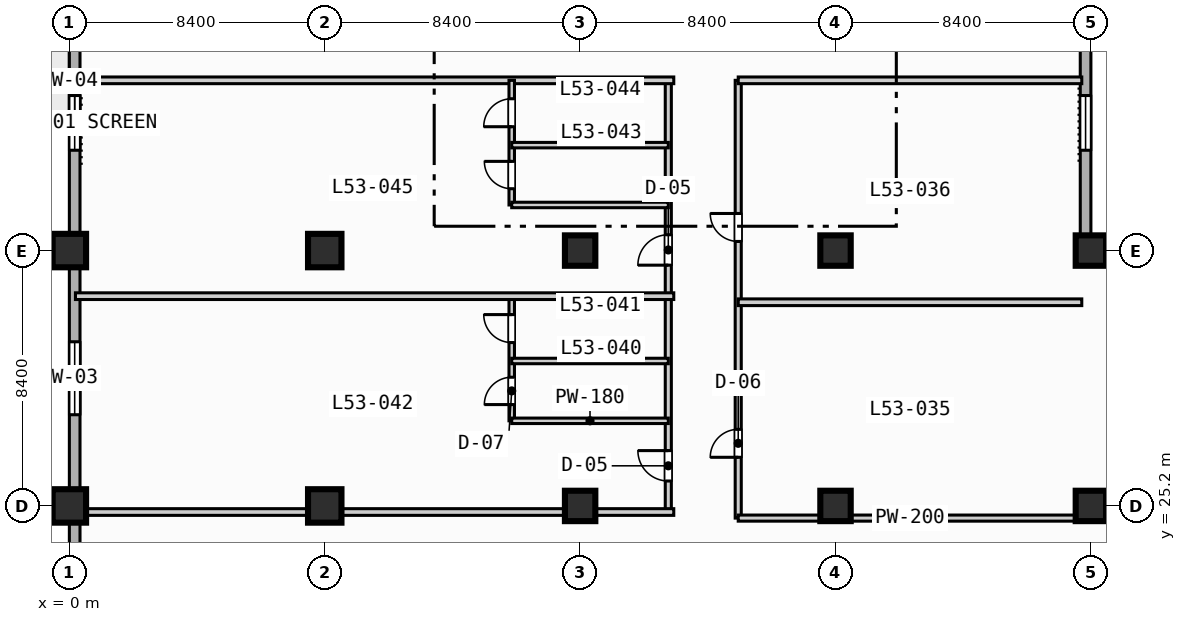
"""IFC4 building model, lengths in metres.
Left out: names, types, materials, properties, quantities, classifications, styles, units other than length and angle.
Written with IfcOpenShell. Run it as: python <this file> out.ifc"""

import sys

from ifc_helpers import new_model, si_unit, direction, frame, frame_2d, origin, origin_2d, place, context, subcontext, project, spatial, rectangle, extrude, element, fill, save


model = new_model("IFC4")
c1 = context("Model", 3, precision=1e-05, world=origin(), true_north=direction((0.0, 1.0)))
c2 = subcontext(c1, "Body", "Model", "MODEL_VIEW")
j1 = project(units=[si_unit("LENGTHUNIT", "METRE"), si_unit("PLANEANGLEUNIT", "RADIAN")], contexts=[c1])
p1 = place(None, origin())
s1 = spatial("IfcSite", under=j1, at=p1, CompositionType="ELEMENT")
p2 = place(p1, origin())
s2 = spatial("IfcBuilding", under=s1, at=p2, CompositionType="ELEMENT")
p3 = place(p2, frame((0.0, 0.0, 216.1)))
s3 = spatial("IfcBuildingStorey", under=s2, at=p3, CompositionType="ELEMENT", Elevation=216.1)
for number, where, z_axis, x_axis in (
    (1, (0.0, 25.2, 0.0), (0.0, 0.0, 1.0), (1.0, 0.0, 0.0)),
    (2, (0.0, 33.6, 0.0), (0.0, 0.0, 1.0), (1.0, 0.0, 0.0)),
    (3, (8.4, 25.2, 0.0), (0.0, 0.0, 1.0), (1.0, 0.0, 0.0)),
    (4, (8.4, 33.6, 0.0), (0.0, 0.0, 1.0), (1.0, 0.0, 0.0)),
):
    element("IfcColumn", number, at=place(p3, frame(where, z_axis=z_axis, x_axis=x_axis)), inside=s3, PredefinedType="COLUMN", context=c2, shape_type="SweptSolid", body=[
        extrude(rectangle(XDim=1.1, YDim=1.1, at=origin_2d()), origin(), (0.0, 0.0, 1.0), 3.7),
    ])
for number, where, z_axis, x_axis in (
    (5, (16.8, 25.2, 0.0), (0.0, 0.0, 1.0), (1.0, 0.0, 0.0)),
    (6, (16.8, 33.6, 0.0), (0.0, 0.0, 1.0), (1.0, 0.0, 0.0)),
    (7, (25.2, 25.2, 0.0), (0.0, 0.0, 1.0), (1.0, 0.0, 0.0)),
    (8, (25.2, 33.6, 0.0), (0.0, 0.0, 1.0), (1.0, 0.0, 0.0)),
    (9, (33.6, 25.2, 0.0), (0.0, 0.0, 1.0), (1.0, 0.0, 0.0)),
    (10, (33.6, 33.6, 0.0), (0.0, 0.0, 1.0), (1.0, 0.0, 0.0)),
):
    element("IfcColumn", number, at=place(p3, frame(where, z_axis=z_axis, x_axis=x_axis)), inside=s3, PredefinedType="COLUMN", context=c2, shape_type="SweptSolid", body=[
        extrude(rectangle(XDim=1.0, YDim=1.0, at=origin_2d()), origin(), (0.0, 0.0, 1.0), 3.7),
    ])
p4 = place(p3, frame((0.175, 3.175, 0.0), z_axis=(0.0, 0.0, 1.0), x_axis=(0.0, 1.0, 0.0)))
e11 = element("IfcWall", 11, at=p4, inside=s3, PredefinedType="STANDARD", context=c2, shape_type="SweptSolid", body=[
    extrude(rectangle(XDim=69.25, YDim=0.35, at=frame_2d((34.625, 0.0))), origin(), (0.0, 0.0, 1.0), 3.47),
])
p5 = place(p4, frame((42.325, 0.0, 0.0)))
e12 = element("IfcOpeningElement", 12, at=p5, cuts=e11, PredefinedType="OPENING", context=c2, shape_type="SweptSolid", body=[
    extrude(rectangle(XDim=1.4, YDim=2.2, at=frame_2d((0.7, 1.1))), frame((0.0, 0.185, 0.0), z_axis=(0.0, -1.0, 0.0), x_axis=(1.0, 0.0, 0.0)), (0.0, 0.0, 1.0), 0.37),
])
p6 = place(p4, frame((25.025, 0.0, 0.85)))
e13 = element("IfcOpeningElement", 13, at=p6, cuts=e11, PredefinedType="OPENING", context=c2, shape_type="SweptSolid", body=[
    extrude(rectangle(XDim=2.4, YDim=1.95, at=frame_2d((1.2, 0.975))), frame((0.0, 0.185, 0.0), z_axis=(0.0, -1.0, 0.0), x_axis=(1.0, 0.0, 0.0)), (0.0, 0.0, 1.0), 0.37),
])
p7 = place(p4, frame((33.725, 0.0, 0.85)))
e14 = element("IfcOpeningElement", 14, at=p7, cuts=e11, PredefinedType="OPENING", context=c2, shape_type="SweptSolid", body=[
    extrude(rectangle(XDim=1.8, YDim=1.8, at=frame_2d((0.9, 0.9))), frame((0.0, 0.185, 0.0), z_axis=(0.0, -1.0, 0.0), x_axis=(1.0, 0.0, 0.0)), (0.0, 0.0, 1.0), 0.37),
])
p8 = place(p4, frame((58.375, 0.0, 0.85)))
e15 = element("IfcOpeningElement", 15, at=p8, cuts=e11, PredefinedType="OPENING", context=c2, shape_type="SweptSolid", body=[
    extrude(rectangle(XDim=1.8, YDim=1.8, at=frame_2d((0.9, 0.9))), frame((0.0, 0.185, 0.0), z_axis=(0.0, -1.0, 0.0), x_axis=(1.0, 0.0, 0.0)), (0.0, 0.0, 1.0), 0.37),
])
p9 = place(p4, frame((64.775, 0.0, 0.85)))
e16 = element("IfcOpeningElement", 16, at=p9, cuts=e11, PredefinedType="OPENING", context=c2, shape_type="SweptSolid", body=[
    extrude(rectangle(XDim=1.8, YDim=1.8, at=frame_2d((0.9, 0.9))), frame((0.0, 0.185, 0.0), z_axis=(0.0, -1.0, 0.0), x_axis=(1.0, 0.0, 0.0)), (0.0, 0.0, 1.0), 0.37),
])
p10 = place(p3, frame((33.425, 72.425, 0.0), z_axis=(0.0, 0.0, 1.0), x_axis=(0.0, -1.0, 0.0)))
e17 = element("IfcWall", 17, at=p10, inside=s3, PredefinedType="STANDARD", context=c2, shape_type="SweptSolid", body=[
    extrude(rectangle(XDim=39.0, YDim=0.35, at=frame_2d((19.5, 0.0))), origin(), (0.0, 0.0, 1.0), 3.47),
])
p11 = place(p10, frame((33.725, 0.0, 0.85)))
e18 = element("IfcOpeningElement", 18, at=p11, cuts=e17, PredefinedType="OPENING", context=c2, shape_type="SweptSolid", body=[
    extrude(rectangle(XDim=1.8, YDim=1.8, at=frame_2d((0.9, 0.9))), frame((0.0, 0.185, 0.0), z_axis=(0.0, -1.0, 0.0), x_axis=(1.0, 0.0, 0.0)), (0.0, 0.0, 1.0), 0.37),
])
p12 = place(p10, frame((16.925, 0.0, 0.85)))
e19 = element("IfcOpeningElement", 19, at=p12, cuts=e17, PredefinedType="OPENING", context=c2, shape_type="SweptSolid", body=[
    extrude(rectangle(XDim=1.8, YDim=1.8, at=frame_2d((0.9, 0.9))), frame((0.0, 0.185, 0.0), z_axis=(0.0, -1.0, 0.0), x_axis=(1.0, 0.0, 0.0)), (0.0, 0.0, 1.0), 0.37),
])
p13 = place(p10, frame((8.225, 0.0, 0.85)))
e20 = element("IfcOpeningElement", 20, at=p13, cuts=e17, PredefinedType="OPENING", context=c2, shape_type="SweptSolid", body=[
    extrude(rectangle(XDim=2.4, YDim=1.95, at=frame_2d((1.2, 0.975))), frame((0.0, 0.185, 0.0), z_axis=(0.0, -1.0, 0.0), x_axis=(1.0, 0.0, 0.0)), (0.0, 0.0, 1.0), 0.37),
])
p14 = place(p3, frame((33.425, 33.425, 0.0), z_axis=(0.0, 0.0, 1.0), x_axis=(1.0, 0.0, 0.0)))
e21 = element("IfcWall", 21, at=p14, inside=s3, PredefinedType="STANDARD", context=c2, shape_type="SweptSolid", body=[
    extrude(rectangle(XDim=39.0, YDim=0.35, at=frame_2d((19.5, 0.0))), origin(), (0.0, 0.0, 1.0), 3.47),
])
p15 = place(p14, frame((12.075, 0.0, 0.0)))
e22 = element("IfcOpeningElement", 22, at=p15, cuts=e21, PredefinedType="OPENING", context=c2, shape_type="SweptSolid", body=[
    extrude(rectangle(XDim=1.4, YDim=2.2, at=frame_2d((0.7, 1.1))), frame((0.0, 0.185, 0.0), z_axis=(0.0, -1.0, 0.0), x_axis=(1.0, 0.0, 0.0)), (0.0, 0.0, 1.0), 0.37),
])
p16 = place(p14, frame((20.275, 0.0, 0.85)))
e23 = element("IfcOpeningElement", 23, at=p16, cuts=e21, PredefinedType="OPENING", context=c2, shape_type="SweptSolid", body=[
    extrude(rectangle(XDim=1.8, YDim=1.8, at=frame_2d((0.9, 0.9))), frame((0.0, 0.185, 0.0), z_axis=(0.0, -1.0, 0.0), x_axis=(1.0, 0.0, 0.0)), (0.0, 0.0, 1.0), 0.37),
])
p17 = place(p14, frame((28.375, 0.0, 0.85)))
e24 = element("IfcOpeningElement", 24, at=p17, cuts=e21, PredefinedType="OPENING", context=c2, shape_type="SweptSolid", body=[
    extrude(rectangle(XDim=2.4, YDim=1.95, at=frame_2d((1.2, 0.975))), frame((0.0, 0.185, 0.0), z_axis=(0.0, -1.0, 0.0), x_axis=(1.0, 0.0, 0.0)), (0.0, 0.0, 1.0), 0.37),
])
p18 = place(p3, frame((22.0, 24.8, 0.0), z_axis=(0.0, 0.0, 1.0), x_axis=(0.0, 1.0, 0.0)))
e25 = element("IfcWall", 25, at=p18, inside=s3, PredefinedType="PARTITIONING", context=c2, shape_type="SweptSolid", body=[
    extrude(rectangle(XDim=14.4, YDim=0.2, at=frame_2d((7.2, 0.0))), origin(), (0.0, 0.0, 1.0), 3.47),
])
p19 = place(p18, frame((2.0, 0.0, 0.0)))
e26 = element("IfcOpeningElement", 26, at=p19, cuts=e25, PredefinedType="OPENING", context=c2, shape_type="SweptSolid", body=[
    extrude(rectangle(XDim=0.92, YDim=2.1, at=frame_2d((0.46, 1.05))), frame((0.0, 0.11, 0.0), z_axis=(0.0, -1.0, 0.0), x_axis=(1.0, 0.0, 0.0)), (0.0, 0.0, 1.0), 0.22),
])
p20 = place(p18, frame((9.1, 0.0, 0.0)))
e27 = element("IfcOpeningElement", 27, at=p20, cuts=e25, PredefinedType="OPENING", context=c2, shape_type="SweptSolid", body=[
    extrude(rectangle(XDim=0.92, YDim=2.1, at=frame_2d((0.46, 1.05))), frame((0.0, 0.11, 0.0), z_axis=(0.0, -1.0, 0.0), x_axis=(1.0, 0.0, 0.0)), (0.0, 0.0, 1.0), 0.22),
])
p21 = place(p3, frame((22.0, 24.8, 0.0), z_axis=(0.0, 0.0, 1.0), x_axis=(1.0, 0.0, 0.0)))
e28 = element("IfcWall", 28, at=p21, inside=s3, PredefinedType="PARTITIONING", context=c2, shape_type="SweptSolid", body=[
    extrude(rectangle(XDim=11.3, YDim=0.2, at=frame_2d((5.65, 0.0))), origin(), (0.0, 0.0, 1.0), 3.47),
])
for number, where, z_axis, x_axis in (
    (29, (22.0, 31.9, 0.0), (0.0, 0.0, 1.0), (1.0, 0.0, 0.0)),
    (30, (22.0, 39.2, 0.0), (0.0, 0.0, 1.0), (1.0, 0.0, 0.0)),
):
    element("IfcWall", number, at=place(p3, frame(where, z_axis=z_axis, x_axis=x_axis)), inside=s3, PredefinedType="PARTITIONING", context=c2, shape_type="SweptSolid", body=[
        extrude(rectangle(XDim=11.3, YDim=0.22, at=frame_2d((5.65, 0.0))), origin(), (0.0, 0.0, 1.0), 3.47),
    ])
p22 = place(p3, frame((19.7, 25.0, 0.0), z_axis=(0.0, 0.0, 1.0), x_axis=(0.0, 1.0, 0.0)))
e31 = element("IfcWall", 31, at=p22, inside=s3, PredefinedType="PARTITIONING", context=c2, shape_type="SweptSolid", body=[
    extrude(rectangle(XDim=14.2, YDim=0.2, at=frame_2d((7.1, 0.0))), origin(), (0.0, 0.0, 1.0), 3.47),
])
p23 = place(p22, frame((1.02, 0.0, 0.0)))
e32 = element("IfcOpeningElement", 32, at=p23, cuts=e31, PredefinedType="OPENING", context=c2, shape_type="SweptSolid", body=[
    extrude(rectangle(XDim=1.0, YDim=2.15, at=frame_2d((0.5, 1.075))), frame((0.0, 0.11, 0.0), z_axis=(0.0, -1.0, 0.0), x_axis=(1.0, 0.0, 0.0)), (0.0, 0.0, 1.0), 0.22),
])
p24 = place(p22, frame((8.12, 0.0, 0.0)))
e33 = element("IfcOpeningElement", 33, at=p24, cuts=e31, PredefinedType="OPENING", context=c2, shape_type="SweptSolid", body=[
    extrude(rectangle(XDim=1.0, YDim=2.15, at=frame_2d((0.5, 1.075))), frame((0.0, 0.11, 0.0), z_axis=(0.0, -1.0, 0.0), x_axis=(1.0, 0.0, 0.0)), (0.0, 0.0, 1.0), 0.22),
])
p25 = place(p3, frame((0.2, 25.0, 0.0), z_axis=(0.0, 0.0, 1.0), x_axis=(1.0, 0.0, 0.0)))
e34 = element("IfcWall", 34, at=p25, inside=s3, PredefinedType="PARTITIONING", context=c2, shape_type="SweptSolid", body=[
    extrude(rectangle(XDim=19.68, YDim=0.22, at=frame_2d((9.84, 0.0))), origin(), (0.0, 0.0, 1.0), 2.82),
])
p26 = place(p3, frame((14.55, 28.0, 0.0), z_axis=(0.0, 0.0, 1.0), x_axis=(0.0, 1.0, 0.0)))
e35 = element("IfcWall", 35, at=p26, inside=s3, PredefinedType="PLUMBINGWALL", context=c2, shape_type="SweptSolid", body=[
    extrude(rectangle(XDim=4.1, YDim=0.18, at=frame_2d((2.05, 0.0))), origin(), (0.0, 0.0, 1.0), 3.47),
])
p27 = place(p26, frame((0.534, 0.0, 0.0)))
e36 = element("IfcOpeningElement", 36, at=p27, cuts=e35, PredefinedType="OPENING", context=c2, shape_type="SweptSolid", body=[
    extrude(rectangle(XDim=0.9, YDim=2.1, at=frame_2d((0.45, 1.05))), frame((0.0, 0.1, 0.0), z_axis=(0.0, -1.0, 0.0), x_axis=(1.0, 0.0, 0.0)), (0.0, 0.0, 1.0), 0.2),
])
p28 = place(p26, frame((2.574, 0.0, 0.0)))
e37 = element("IfcOpeningElement", 37, at=p28, cuts=e35, PredefinedType="OPENING", context=c2, shape_type="SweptSolid", body=[
    extrude(rectangle(XDim=0.92, YDim=2.1, at=frame_2d((0.46, 1.05))), frame((0.0, 0.1, 0.0), z_axis=(0.0, -1.0, 0.0), x_axis=(1.0, 0.0, 0.0)), (0.0, 0.0, 1.0), 0.2),
])
for number, where, z_axis, x_axis in (
    (38, (14.55, 28.0, 0.0), (0.0, 0.0, 1.0), (1.0, 0.0, 0.0)),
    (39, (14.55, 29.968, 0.0), (0.0, 0.0, 1.0), (1.0, 0.0, 0.0)),
):
    element("IfcWall", number, at=place(p3, frame(where, z_axis=z_axis, x_axis=x_axis)), inside=s3, PredefinedType="PLUMBINGWALL", context=c2, shape_type="SweptSolid", body=[
        extrude(rectangle(XDim=5.15, YDim=0.18, at=frame_2d((2.575, 0.0))), origin(), (0.0, 0.0, 1.0), 3.47),
    ])
for number, where, z_axis, x_axis in (
    (40, (0.2, 32.1, 0.0), (0.0, 0.0, 1.0), (1.0, 0.0, 0.0)),
    (41, (0.2, 39.2, 0.0), (0.0, 0.0, 1.0), (1.0, 0.0, 0.0)),
):
    element("IfcWall", number, at=place(p3, frame(where, z_axis=z_axis, x_axis=x_axis)), inside=s3, PredefinedType="PARTITIONING", context=c2, shape_type="SweptSolid", body=[
        extrude(rectangle(XDim=19.68, YDim=0.22, at=frame_2d((9.84, 0.0))), origin(), (0.0, 0.0, 1.0), 3.47),
    ])
p29 = place(p3, frame((14.55, 35.1, 0.0), z_axis=(0.0, 0.0, 1.0), x_axis=(0.0, 1.0, 0.0)))
e42 = element("IfcWall", 42, at=p29, inside=s3, PredefinedType="PLUMBINGWALL", context=c2, shape_type="SweptSolid", body=[
    extrude(rectangle(XDim=4.1, YDim=0.18, at=frame_2d((2.05, 0.0))), origin(), (0.0, 0.0, 1.0), 3.47),
])
p30 = place(p29, frame((0.534, 0.0, 0.0)))
e43 = element("IfcOpeningElement", 43, at=p30, cuts=e42, PredefinedType="OPENING", context=c2, shape_type="SweptSolid", body=[
    extrude(rectangle(XDim=0.9, YDim=2.1, at=frame_2d((0.45, 1.05))), frame((0.0, 0.1, 0.0), z_axis=(0.0, -1.0, 0.0), x_axis=(1.0, 0.0, 0.0)), (0.0, 0.0, 1.0), 0.2),
])
p31 = place(p29, frame((2.574, 0.0, 0.0)))
e44 = element("IfcOpeningElement", 44, at=p31, cuts=e42, PredefinedType="OPENING", context=c2, shape_type="SweptSolid", body=[
    extrude(rectangle(XDim=0.92, YDim=2.1, at=frame_2d((0.46, 1.05))), frame((0.0, 0.1, 0.0), z_axis=(0.0, -1.0, 0.0), x_axis=(1.0, 0.0, 0.0)), (0.0, 0.0, 1.0), 0.2),
])
for number, where, z_axis, x_axis in (
    (45, (14.55, 35.1, 0.0), (0.0, 0.0, 1.0), (1.0, 0.0, 0.0)),
    (46, (14.55, 37.068, 0.0), (0.0, 0.0, 1.0), (1.0, 0.0, 0.0)),
):
    element("IfcWall", number, at=place(p3, frame(where, z_axis=z_axis, x_axis=x_axis)), inside=s3, PredefinedType="PLUMBINGWALL", context=c2, shape_type="SweptSolid", body=[
        extrude(rectangle(XDim=5.15, YDim=0.18, at=frame_2d((2.575, 0.0))), origin(), (0.0, 0.0, 1.0), 3.47),
    ])
p32 = place(p6, origin())
e47 = element("IfcWindow", 47, at=p32, inside=s3, PartitioningType="SINGLE_PANEL", PredefinedType="WINDOW", context=c2, shape_type="SweptSolid", body=[
    extrude(rectangle(XDim=2.4, YDim=1.95, at=frame_2d((1.2, 0.975))), frame((0.0, 0.03, 0.0), z_axis=(0.0, -1.0, 0.0), x_axis=(1.0, 0.0, 0.0)), (0.0, 0.0, 1.0), 0.06),
])
fill(e13, e47)
p33 = place(p7, origin())
e48 = element("IfcWindow", 48, at=p33, inside=s3, PartitioningType="SINGLE_PANEL", PredefinedType="WINDOW", context=c2, shape_type="SweptSolid", body=[
    extrude(rectangle(XDim=1.8, YDim=1.8, at=frame_2d((0.9, 0.9))), frame((0.0, 0.03, 0.0), z_axis=(0.0, -1.0, 0.0), x_axis=(1.0, 0.0, 0.0)), (0.0, 0.0, 1.0), 0.06),
])
fill(e14, e48)
p34 = place(p11, origin())
e49 = element("IfcWindow", 49, at=p34, inside=s3, PartitioningType="SINGLE_PANEL", PredefinedType="WINDOW", context=c2, shape_type="SweptSolid", body=[
    extrude(rectangle(XDim=1.8, YDim=1.8, at=frame_2d((0.9, 0.9))), frame((0.0, 0.03, 0.0), z_axis=(0.0, -1.0, 0.0), x_axis=(1.0, 0.0, 0.0)), (0.0, 0.0, 1.0), 0.06),
])
fill(e18, e49)
p35 = place(p19, origin())
e50 = element("IfcDoor", 50, at=p35, inside=s3, OperationType="SINGLE_SWING_LEFT", PredefinedType="DOOR", context=c2, shape_type="SweptSolid", body=[
    extrude(rectangle(XDim=0.92, YDim=2.1, at=frame_2d((0.46, 1.05))), frame((0.0, 0.025, 0.0), z_axis=(0.0, -1.0, 0.0), x_axis=(1.0, 0.0, 0.0)), (0.0, 0.0, 1.0), 0.05),
])
fill(e26, e50)
p36 = place(p20, origin())
e51 = element("IfcDoor", 51, at=p36, inside=s3, OperationType="SINGLE_SWING_RIGHT", PredefinedType="DOOR", context=c2, shape_type="SweptSolid", body=[
    extrude(rectangle(XDim=0.92, YDim=2.1, at=frame_2d((0.46, 1.05))), frame((0.0, 0.025, 0.0), z_axis=(0.0, -1.0, 0.0), x_axis=(1.0, 0.0, 0.0)), (0.0, 0.0, 1.0), 0.05),
])
fill(e27, e51)
p37 = place(p23, origin())
e52 = element("IfcDoor", 52, at=p37, inside=s3, OperationType="SINGLE_SWING_RIGHT", PredefinedType="DOOR", context=c2, shape_type="SweptSolid", body=[
    extrude(rectangle(XDim=1.0, YDim=2.15, at=frame_2d((0.5, 1.075))), frame((0.0, 0.025, 0.0), z_axis=(0.0, -1.0, 0.0), x_axis=(1.0, 0.0, 0.0)), (0.0, 0.0, 1.0), 0.05),
])
fill(e32, e52)
p38 = place(p24, origin())
e53 = element("IfcDoor", 53, at=p38, inside=s3, OperationType="SINGLE_SWING_LEFT", PredefinedType="DOOR", context=c2, shape_type="SweptSolid", body=[
    extrude(rectangle(XDim=1.0, YDim=2.15, at=frame_2d((0.5, 1.075))), frame((0.0, 0.025, 0.0), z_axis=(0.0, -1.0, 0.0), x_axis=(1.0, 0.0, 0.0)), (0.0, 0.0, 1.0), 0.05),
])
fill(e33, e53)
p39 = place(p27, origin())
e54 = element("IfcDoor", 54, at=p39, inside=s3, OperationType="SINGLE_SWING_LEFT", PredefinedType="DOOR", context=c2, shape_type="SweptSolid", body=[
    extrude(rectangle(XDim=0.9, YDim=2.1, at=frame_2d((0.45, 1.05))), frame((0.0, 0.025, 0.0), z_axis=(0.0, -1.0, 0.0), x_axis=(1.0, 0.0, 0.0)), (0.0, 0.0, 1.0), 0.05),
])
fill(e36, e54)
p40 = place(p28, origin())
e55 = element("IfcDoor", 55, at=p40, inside=s3, OperationType="SINGLE_SWING_RIGHT", PredefinedType="DOOR", context=c2, shape_type="SweptSolid", body=[
    extrude(rectangle(XDim=0.92, YDim=2.1, at=frame_2d((0.46, 1.05))), frame((0.0, 0.025, 0.0), z_axis=(0.0, -1.0, 0.0), x_axis=(1.0, 0.0, 0.0)), (0.0, 0.0, 1.0), 0.05),
])
fill(e37, e55)
p41 = place(p30, origin())
e56 = element("IfcDoor", 56, at=p41, inside=s3, OperationType="SINGLE_SWING_RIGHT", PredefinedType="DOOR", context=c2, shape_type="SweptSolid", body=[
    extrude(rectangle(XDim=0.9, YDim=2.1, at=frame_2d((0.45, 1.05))), frame((0.0, 0.025, 0.0), z_axis=(0.0, -1.0, 0.0), x_axis=(1.0, 0.0, 0.0)), (0.0, 0.0, 1.0), 0.05),
])
fill(e43, e56)
p42 = place(p31, origin())
e57 = element("IfcDoor", 57, at=p42, inside=s3, OperationType="SINGLE_SWING_LEFT", PredefinedType="DOOR", context=c2, shape_type="SweptSolid", body=[
    extrude(rectangle(XDim=0.92, YDim=2.1, at=frame_2d((0.46, 1.05))), frame((0.0, 0.025, 0.0), z_axis=(0.0, -1.0, 0.0), x_axis=(1.0, 0.0, 0.0)), (0.0, 0.0, 1.0), 0.05),
])
fill(e44, e57)
save(model, sys.argv[1])
